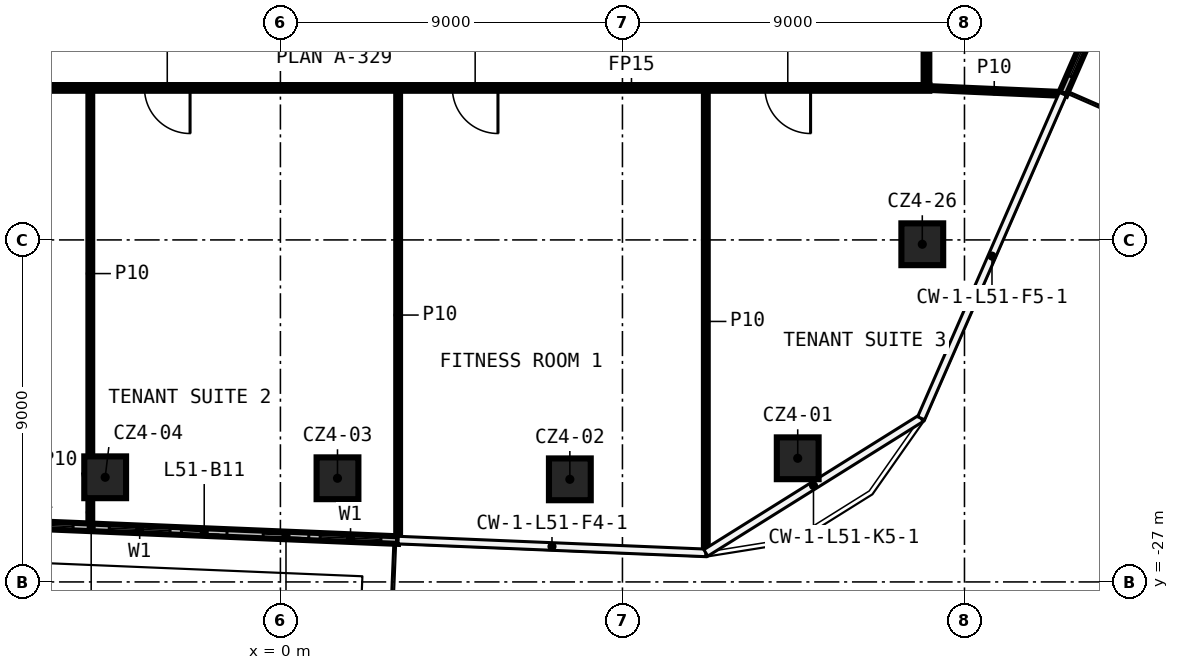
"""IFC4 building model, lengths in metres.
Left out: names, types, materials, properties, quantities, classifications, styles, units other than length and angle.
Written with IfcOpenShell. Run it as: python <this file> out.ifc"""

import sys

from ifc_helpers import new_model, si_unit, direction, frame, frame_2d, origin, origin_2d, place, context, subcontext, project, spatial, rectangle, extrude, element, fill, save


model = new_model("IFC4")
c1 = context("Model", 3, precision=1e-05, world=origin(), true_north=direction((0.0, 1.0)))
c2 = subcontext(c1, "Body", "Model", "MODEL_VIEW")
j1 = project(units=[si_unit("LENGTHUNIT", "METRE"), si_unit("PLANEANGLEUNIT", "RADIAN")], contexts=[c1])
p1 = place(None, origin())
s1 = spatial("IfcSite", under=j1, at=p1, CompositionType="ELEMENT")
p2 = place(p1, origin())
s2 = spatial("IfcBuilding", under=s1, at=p2, CompositionType="ELEMENT")
p3 = place(p2, frame((0.0, 0.0, 245.4)))
s3 = spatial("IfcBuildingStorey", under=s2, at=p3, CompositionType="ELEMENT", Elevation=245.4)
for number, where, z_axis, x_axis in (
    (1, (13.612, -23.746, 0.0), (0.0, 0.0, 1.0), (1.0, 0.0, 0.0)),
    (2, (7.616, -24.3, 0.0), (0.0, 0.0, 1.0), (1.0, 0.0, 0.0)),
    (3, (1.502, -24.272, 0.0), (0.0, 0.0, 1.0), (1.0, 0.0, 0.0)),
    (4, (-4.611, -24.246, 0.0), (0.0, 0.0, 1.0), (1.0, 0.0, 0.0)),
    (5, (16.89, -18.114, 0.0), (0.0, 0.0, 1.0), (1.0, 0.0, 0.0)),
):
    element("IfcColumn", number, at=place(p3, frame(where, z_axis=z_axis, x_axis=x_axis)), inside=s3, PredefinedType="COLUMN", context=c2, shape_type="SweptSolid", body=[
        extrude(rectangle(XDim=1.1, YDim=1.1, at=origin_2d()), origin(), (0.0, 0.0, 1.0), 3.82),
    ])
p4 = place(p3, frame((17.075, -14.0, 0.0), z_axis=(0.0, 0.0, 1.0), x_axis=(-1.0, 0.0, 0.0)))
e6 = element("IfcWall", 6, at=p4, inside=s3, PredefinedType="PARTITIONING", context=c2, shape_type="SweptSolid", body=[
    extrude(rectangle(XDim=26.15, YDim=0.15, at=frame_2d((13.075, 0.0))), origin(), (0.0, 0.0, 1.0), 3.82),
])
p5 = place(p4, frame((23.476, 0.0, 0.0)))
e7 = element("IfcOpeningElement", 7, at=p5, cuts=e6, PredefinedType="OPENING", context=c2, shape_type="SweptSolid", body=[
    extrude(rectangle(XDim=1.2, YDim=2.1, at=frame_2d((0.6, 1.05))), frame((0.0, 0.085, 0.0), z_axis=(0.0, -1.0, 0.0), x_axis=(1.0, 0.0, 0.0)), (0.0, 0.0, 1.0), 0.17),
])
p6 = place(p4, frame((19.452, 0.0, 0.0)))
e8 = element("IfcOpeningElement", 8, at=p6, cuts=e6, PredefinedType="OPENING", context=c2, shape_type="SweptSolid", body=[
    extrude(rectangle(XDim=1.2, YDim=2.1, at=frame_2d((0.6, 1.05))), frame((0.0, 0.085, 0.0), z_axis=(0.0, -1.0, 0.0), x_axis=(1.0, 0.0, 0.0)), (0.0, 0.0, 1.0), 0.17),
])
p7 = place(p4, frame((11.351, 0.0, 0.0)))
e9 = element("IfcOpeningElement", 9, at=p7, cuts=e6, PredefinedType="OPENING", context=c2, shape_type="SweptSolid", body=[
    extrude(rectangle(XDim=1.2, YDim=2.1, at=frame_2d((0.6, 1.05))), frame((0.0, 0.085, 0.0), z_axis=(0.0, -1.0, 0.0), x_axis=(1.0, 0.0, 0.0)), (0.0, 0.0, 1.0), 0.17),
])
p8 = place(p4, frame((3.125, 0.0, 0.0)))
e10 = element("IfcOpeningElement", 10, at=p8, cuts=e6, PredefinedType="OPENING", context=c2, shape_type="SweptSolid", body=[
    extrude(rectangle(XDim=1.2, YDim=2.1, at=frame_2d((0.6, 1.05))), frame((0.0, 0.085, 0.0), z_axis=(0.0, -1.0, 0.0), x_axis=(1.0, 0.0, 0.0)), (0.0, 0.0, 1.0), 0.17),
])
p9 = place(p3, frame((17.0, 13.925, 0.0), z_axis=(0.0, 0.0, 1.0), x_axis=(0.0, -1.0, 0.0)))
e11 = element("IfcWall", 11, at=p9, inside=s3, PredefinedType="PARTITIONING", context=c2, shape_type="SweptSolid", body=[
    extrude(rectangle(XDim=27.85, YDim=0.15, at=frame_2d((13.925, 0.0))), origin(), (0.0, 0.0, 1.0), 3.82),
])
p10 = place(p9, frame((16.802, 0.0, 0.0)))
e12 = element("IfcOpeningElement", 12, at=p10, cuts=e11, PredefinedType="OPENING", context=c2, shape_type="SweptSolid", body=[
    extrude(rectangle(XDim=1.2, YDim=2.1, at=frame_2d((0.6, 1.05))), frame((0.0, 0.085, 0.0), z_axis=(0.0, -1.0, 0.0), x_axis=(1.0, 0.0, 0.0)), (0.0, 0.0, 1.0), 0.17),
])
p11 = place(p9, frame((12.534, 0.0, 0.0)))
e13 = element("IfcOpeningElement", 13, at=p11, cuts=e11, PredefinedType="OPENING", context=c2, shape_type="SweptSolid", body=[
    extrude(rectangle(XDim=1.2, YDim=2.1, at=frame_2d((0.6, 1.05))), frame((0.0, 0.085, 0.0), z_axis=(0.0, -1.0, 0.0), x_axis=(1.0, 0.0, 0.0)), (0.0, 0.0, 1.0), 0.17),
])
p12 = place(p3, frame((11.194, -26.215, 0.0), z_axis=(0.0, 0.0, 1.0), x_axis=(0.0, 1.0, 0.0)))
e14 = element("IfcWall", 14, at=p12, inside=s3, PredefinedType="PARTITIONING", context=c2, shape_type="SweptSolid", body=[
    extrude(rectangle(XDim=12.14, YDim=0.1, at=frame_2d((6.07, 0.0))), origin(), (0.0, 0.0, 1.0), 3.82),
])
p13 = place(p3, frame((3.098, -25.879, 0.0), z_axis=(0.0, 0.0, 1.0), x_axis=(0.0, 1.0, 0.0)))
e15 = element("IfcWall", 15, at=p13, inside=s3, PredefinedType="PARTITIONING", context=c2, shape_type="SweptSolid", body=[
    extrude(rectangle(XDim=11.804, YDim=0.1, at=frame_2d((5.902, 0.0))), origin(), (0.0, 0.0, 1.0), 3.82),
])
p14 = place(p3, frame((-5.002, -25.543, 0.0), z_axis=(0.0, 0.0, 1.0), x_axis=(0.0, 1.0, 0.0)))
e16 = element("IfcWall", 16, at=p14, inside=s3, PredefinedType="PARTITIONING", context=c2, shape_type="SweptSolid", body=[
    extrude(rectangle(XDim=0.747, YDim=0.1, at=frame_2d((0.374, 0.0))), origin(), (0.0, 0.0, 1.0), 3.82),
])
p15 = place(p3, frame((-5.002, -23.696, 0.0), z_axis=(0.0, 0.0, 1.0), x_axis=(0.0, 1.0, 0.0)))
e17 = element("IfcWall", 17, at=p15, inside=s3, PredefinedType="PARTITIONING", context=c2, shape_type="SweptSolid", body=[
    extrude(rectangle(XDim=9.621, YDim=0.1, at=frame_2d((4.811, 0.0))), origin(), (0.0, 0.0, 1.0), 3.82),
])
p16 = place(p3, frame((17.0, -14.0, 0.0), z_axis=(0.0, 0.0, 1.0), x_axis=(0.99903279054, -0.043971393272, 0.0)))
e18 = element("IfcWall", 18, at=p16, inside=s3, PredefinedType="PARTITIONING", context=c2, shape_type="SweptSolid", body=[
    extrude(rectangle(XDim=3.57, YDim=0.1, at=frame_2d((1.785, 0.0))), origin(), (0.0, 0.0, 1.0), 3.82),
])
p17 = place(p3, frame((-9.052, -25.395, 0.0), z_axis=(0.0, 0.0, 1.0), x_axis=(0.999139463312, -0.041476895419, 0.0)))
e19 = element("IfcWall", 19, at=p17, inside=s3, PredefinedType="SOLIDWALL", context=c2, shape_type="SweptSolid", body=[
    extrude(rectangle(XDim=12.161, YDim=0.2, at=frame_2d((6.081, 0.0))), origin(), (0.0, 0.0, 1.0), 3.82),
])
p18 = place(p17, frame((2.0, 0.0, 0.6)))
e20 = element("IfcOpeningElement", 20, at=p18, cuts=e19, PredefinedType="OPENING", context=c2, shape_type="SweptSolid", body=[
    extrude(rectangle(XDim=1.6, YDim=2.4, at=frame_2d((0.8, 1.2))), frame((0.0, 0.11, 0.0), z_axis=(0.0, -1.0, 0.0), x_axis=(1.0, 0.0, 0.0)), (0.0, 0.0, 1.0), 0.22),
])
p19 = place(p17, frame((0.5, 0.0, 0.0)))
e21 = element("IfcOpeningElement", 21, at=p19, cuts=e19, PredefinedType="OPENING", context=c2, shape_type="SweptSolid", body=[
    extrude(rectangle(XDim=1.2, YDim=2.4, at=frame_2d((0.6, 1.2))), frame((0.0, 0.11, 0.0), z_axis=(0.0, -1.0, 0.0), x_axis=(1.0, 0.0, 0.0)), (0.0, 0.0, 1.0), 0.22),
])
p20 = place(p17, frame((4.554, 0.0, 0.6)))
e22 = element("IfcOpeningElement", 22, at=p20, cuts=e19, PredefinedType="OPENING", context=c2, shape_type="SweptSolid", body=[
    extrude(rectangle(XDim=1.6, YDim=2.4, at=frame_2d((0.8, 1.2))), frame((0.0, 0.11, 0.0), z_axis=(0.0, -1.0, 0.0), x_axis=(1.0, 0.0, 0.0)), (0.0, 0.0, 1.0), 0.22),
])
p21 = place(p17, frame((6.454, 0.0, 0.0)))
e23 = element("IfcOpeningElement", 23, at=p21, cuts=e19, PredefinedType="OPENING", context=c2, shape_type="SweptSolid", body=[
    extrude(rectangle(XDim=1.2, YDim=2.4, at=frame_2d((0.6, 1.2))), frame((0.0, 0.11, 0.0), z_axis=(0.0, -1.0, 0.0), x_axis=(1.0, 0.0, 0.0)), (0.0, 0.0, 1.0), 0.22),
])
p22 = place(p17, frame((10.107, 0.0, 0.6)))
e24 = element("IfcOpeningElement", 24, at=p22, cuts=e19, PredefinedType="OPENING", context=c2, shape_type="SweptSolid", body=[
    extrude(rectangle(XDim=1.6, YDim=2.4, at=frame_2d((0.8, 1.2))), frame((0.0, 0.11, 0.0), z_axis=(0.0, -1.0, 0.0), x_axis=(1.0, 0.0, 0.0)), (0.0, 0.0, 1.0), 0.22),
])
p23 = place(p17, frame((8.607, 0.0, 0.0)))
e25 = element("IfcOpeningElement", 25, at=p23, cuts=e19, PredefinedType="OPENING", context=c2, shape_type="SweptSolid", body=[
    extrude(rectangle(XDim=1.2, YDim=2.4, at=frame_2d((0.6, 1.2))), frame((0.0, 0.11, 0.0), z_axis=(0.0, -1.0, 0.0), x_axis=(1.0, 0.0, 0.0)), (0.0, 0.0, 1.0), 0.22),
])
p24 = place(p3, frame((20.588, -14.158, 0.0), z_axis=(0.0, 0.0, 1.0), x_axis=(0.400286749381, 0.916389937892, 0.0)))
e26 = element("IfcWall", 26, at=p24, inside=s3, PredefinedType="SOLIDWALL", context=c2, shape_type="SweptSolid", body=[
    extrude(rectangle(XDim=13.987, YDim=0.2, at=frame_2d((6.993, 0.0))), origin(), (0.0, 0.0, 1.0), 3.82),
])
p25 = place(p24, frame((0.5, 0.0, 0.6)))
e27 = element("IfcOpeningElement", 27, at=p25, cuts=e26, PredefinedType="OPENING", context=c2, shape_type="SweptSolid", body=[
    extrude(rectangle(XDim=1.6, YDim=2.4, at=frame_2d((0.8, 1.2))), frame((0.0, 0.11, 0.0), z_axis=(0.0, -1.0, 0.0), x_axis=(1.0, 0.0, 0.0)), (0.0, 0.0, 1.0), 0.22),
])
p26 = place(p24, frame((2.4, 0.0, 0.0)))
e28 = element("IfcOpeningElement", 28, at=p26, cuts=e26, PredefinedType="OPENING", context=c2, shape_type="SweptSolid", body=[
    extrude(rectangle(XDim=1.2, YDim=2.4, at=frame_2d((0.6, 1.2))), frame((0.0, 0.11, 0.0), z_axis=(0.0, -1.0, 0.0), x_axis=(1.0, 0.0, 0.0)), (0.0, 0.0, 1.0), 0.22),
])
p27 = place(p24, frame((6.662, 0.0, 0.6)))
e29 = element("IfcOpeningElement", 29, at=p27, cuts=e26, PredefinedType="OPENING", context=c2, shape_type="SweptSolid", body=[
    extrude(rectangle(XDim=1.6, YDim=2.4, at=frame_2d((0.8, 1.2))), frame((0.0, 0.11, 0.0), z_axis=(0.0, -1.0, 0.0), x_axis=(1.0, 0.0, 0.0)), (0.0, 0.0, 1.0), 0.22),
])
p28 = place(p24, frame((5.162, 0.0, 0.0)))
e30 = element("IfcOpeningElement", 30, at=p28, cuts=e26, PredefinedType="OPENING", context=c2, shape_type="SweptSolid", body=[
    extrude(rectangle(XDim=1.2, YDim=2.4, at=frame_2d((0.6, 1.2))), frame((0.0, 0.11, 0.0), z_axis=(0.0, -1.0, 0.0), x_axis=(1.0, 0.0, 0.0)), (0.0, 0.0, 1.0), 0.22),
])
p29 = place(p24, frame((11.324, 0.0, 0.6)))
e31 = element("IfcOpeningElement", 31, at=p29, cuts=e26, PredefinedType="OPENING", context=c2, shape_type="SweptSolid", body=[
    extrude(rectangle(XDim=1.6, YDim=2.4, at=frame_2d((0.8, 1.2))), frame((0.0, 0.11, 0.0), z_axis=(0.0, -1.0, 0.0), x_axis=(1.0, 0.0, 0.0)), (0.0, 0.0, 1.0), 0.22),
])
p30 = place(p24, frame((9.824, 0.0, 0.0)))
e32 = element("IfcOpeningElement", 32, at=p30, cuts=e26, PredefinedType="OPENING", context=c2, shape_type="SweptSolid", body=[
    extrude(rectangle(XDim=1.2, YDim=2.4, at=frame_2d((0.6, 1.2))), frame((0.0, 0.11, 0.0), z_axis=(0.0, -1.0, 0.0), x_axis=(1.0, 0.0, 0.0)), (0.0, 0.0, 1.0), 0.22),
])
p31 = place(p6, origin())
e33 = element("IfcDoor", 33, at=p31, inside=s3, OperationType="SINGLE_SWING_LEFT", PredefinedType="DOOR", context=c2, shape_type="SweptSolid", body=[
    extrude(rectangle(XDim=1.2, YDim=2.1, at=frame_2d((0.6, 1.05))), frame((0.0, 0.025, 0.0), z_axis=(0.0, -1.0, 0.0), x_axis=(1.0, 0.0, 0.0)), (0.0, 0.0, 1.0), 0.05),
])
fill(e8, e33)
p32 = place(p7, origin())
e34 = element("IfcDoor", 34, at=p32, inside=s3, OperationType="SINGLE_SWING_RIGHT", PredefinedType="DOOR", context=c2, shape_type="SweptSolid", body=[
    extrude(rectangle(XDim=1.2, YDim=2.1, at=frame_2d((0.6, 1.05))), frame((0.0, 0.025, 0.0), z_axis=(0.0, -1.0, 0.0), x_axis=(1.0, 0.0, 0.0)), (0.0, 0.0, 1.0), 0.05),
])
fill(e9, e34)
p33 = place(p8, origin())
e35 = element("IfcDoor", 35, at=p33, inside=s3, OperationType="SINGLE_SWING_LEFT", PredefinedType="DOOR", context=c2, shape_type="SweptSolid", body=[
    extrude(rectangle(XDim=1.2, YDim=2.1, at=frame_2d((0.6, 1.05))), frame((0.0, 0.025, 0.0), z_axis=(0.0, -1.0, 0.0), x_axis=(1.0, 0.0, 0.0)), (0.0, 0.0, 1.0), 0.05),
])
fill(e10, e35)
p34 = place(p18, origin())
e36 = element("IfcWindow", 36, at=p34, inside=s3, PartitioningType="SINGLE_PANEL", PredefinedType="WINDOW", context=c2, shape_type="SweptSolid", body=[
    extrude(rectangle(XDim=1.6, YDim=2.4, at=frame_2d((0.8, 1.2))), frame((0.0, 0.03, 0.0), z_axis=(0.0, -1.0, 0.0), x_axis=(1.0, 0.0, 0.0)), (0.0, 0.0, 1.0), 0.06),
])
fill(e20, e36)
p35 = place(p20, origin())
e37 = element("IfcWindow", 37, at=p35, inside=s3, PartitioningType="SINGLE_PANEL", PredefinedType="WINDOW", context=c2, shape_type="SweptSolid", body=[
    extrude(rectangle(XDim=1.6, YDim=2.4, at=frame_2d((0.8, 1.2))), frame((0.0, 0.03, 0.0), z_axis=(0.0, -1.0, 0.0), x_axis=(1.0, 0.0, 0.0)), (0.0, 0.0, 1.0), 0.06),
])
fill(e22, e37)
p36 = place(p21, origin())
e38 = element("IfcDoor", 38, at=p36, inside=s3, OperationType="SLIDING_TO_LEFT", PredefinedType="DOOR", context=c2, shape_type="SweptSolid", body=[
    extrude(rectangle(XDim=1.2, YDim=2.4, at=frame_2d((0.6, 1.2))), frame((0.0, 0.025, 0.0), z_axis=(0.0, -1.0, 0.0), x_axis=(1.0, 0.0, 0.0)), (0.0, 0.0, 1.0), 0.05),
])
fill(e23, e38)
p37 = place(p22, origin())
e39 = element("IfcWindow", 39, at=p37, inside=s3, PartitioningType="SINGLE_PANEL", PredefinedType="WINDOW", context=c2, shape_type="SweptSolid", body=[
    extrude(rectangle(XDim=1.6, YDim=2.4, at=frame_2d((0.8, 1.2))), frame((0.0, 0.03, 0.0), z_axis=(0.0, -1.0, 0.0), x_axis=(1.0, 0.0, 0.0)), (0.0, 0.0, 1.0), 0.06),
])
fill(e24, e39)
p38 = place(p23, origin())
e40 = element("IfcDoor", 40, at=p38, inside=s3, OperationType="SLIDING_TO_LEFT", PredefinedType="DOOR", context=c2, shape_type="SweptSolid", body=[
    extrude(rectangle(XDim=1.2, YDim=2.4, at=frame_2d((0.6, 1.2))), frame((0.0, 0.025, 0.0), z_axis=(0.0, -1.0, 0.0), x_axis=(1.0, 0.0, 0.0)), (0.0, 0.0, 1.0), 0.05),
])
fill(e25, e40)
p39 = place(p25, origin())
e41 = element("IfcWindow", 41, at=p39, inside=s3, PartitioningType="SINGLE_PANEL", PredefinedType="WINDOW", context=c2, shape_type="SweptSolid", body=[
    extrude(rectangle(XDim=1.6, YDim=2.4, at=frame_2d((0.8, 1.2))), frame((0.0, 0.03, 0.0), z_axis=(0.0, -1.0, 0.0), x_axis=(1.0, 0.0, 0.0)), (0.0, 0.0, 1.0), 0.06),
])
fill(e27, e41)
save(model, sys.argv[1])
